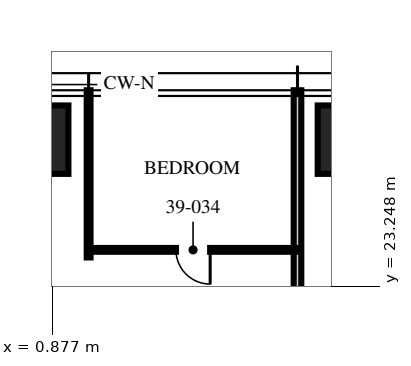
"""IFC4 building model, lengths in metres.
Left out: names, types, materials, properties, quantities, classifications, styles, units other than length and angle.
Written with IfcOpenShell. Run it as: python <this file> out.ifc"""

import sys

from ifc_helpers import new_model, si_unit, direction, frame, frame_2d, origin, origin_2d, place, context, subcontext, project, spatial, rectangle, extrude, element, fill, save


model = new_model("IFC4")
c1 = context("Model", 3, precision=1e-05, world=origin(), true_north=direction((0.0, 1.0)))
c2 = subcontext(c1, "Body", "Model", "MODEL_VIEW")
j1 = project(units=[si_unit("LENGTHUNIT", "METRE"), si_unit("PLANEANGLEUNIT", "RADIAN")], contexts=[c1])
p1 = place(None, origin())
s1 = spatial("IfcSite", under=j1, at=p1, CompositionType="ELEMENT")
p2 = place(p1, origin())
s2 = spatial("IfcBuilding", under=s1, at=p2, CompositionType="ELEMENT")
p3 = place(p2, frame((0.0, 0.0, 156.0)))
s3 = spatial("IfcBuildingStorey", under=s2, at=p3, CompositionType="ELEMENT", Elevation=156.0)
for number, where, z_axis, x_axis in (
    (1, (0.0, 27.1, 0.0), (0.0, 0.0, 1.0), (1.0, 0.0, 0.0)),
    (2, (9.16, 27.1, 0.0), (0.0, 0.0, 1.0), (1.0, 0.0, 0.0)),
):
    element("IfcColumn", number, at=place(p3, frame(where, z_axis=z_axis, x_axis=x_axis)), inside=s3, PredefinedType="COLUMN", context=c2, shape_type="SweptSolid", body=[
        extrude(rectangle(XDim=2.6, YDim=1.8, at=origin_2d()), origin(), (0.0, 0.0, 1.0), 3.75),
    ])
p4 = place(p3, frame((7.328, 16.5, 0.0), z_axis=(0.0, 0.0, 1.0), x_axis=(0.0, 1.0, 0.0)))
e3 = element("IfcWall", 3, at=p4, inside=s3, PredefinedType="PARTITIONING", context=c2, shape_type="SweptSolid", body=[
    extrude(rectangle(XDim=11.9, YDim=0.2, at=frame_2d((5.95, 0.0))), origin(), (0.0, 0.0, 1.0), 2.81),
])
p5 = place(p3, frame((1.832, 24.0, 0.0), z_axis=(0.0, 0.0, 1.0), x_axis=(0.0, 1.0, 0.0)))
e4 = element("IfcWall", 4, at=p5, inside=s3, PredefinedType="PARTITIONING", context=c2, shape_type="SweptSolid", body=[
    extrude(rectangle(XDim=4.4, YDim=0.1, at=frame_2d((2.2, 0.0))), origin(), (0.0, 0.0, 1.0), 2.81),
])
p6 = place(p3, frame((7.328, 24.2, 0.0), z_axis=(0.0, 0.0, 1.0), x_axis=(-1.0, 0.0, 0.0)))
e5 = element("IfcWall", 5, at=p6, inside=s3, PredefinedType="PARTITIONING", context=c2, shape_type="SweptSolid", body=[
    extrude(rectangle(XDim=5.496, YDim=0.1, at=frame_2d((2.748, 0.0))), origin(), (0.0, 0.0, 1.0), 2.81),
])
p7 = place(p6, frame((2.298, 0.0, 0.0)))
e6 = element("IfcOpeningElement", 6, at=p7, cuts=e5, PredefinedType="OPENING", context=c2, shape_type="SweptSolid", body=[
    extrude(rectangle(XDim=0.9, YDim=2.1, at=frame_2d((0.45, 1.05))), frame((0.0, 0.06, 0.0), z_axis=(0.0, -1.0, 0.0), x_axis=(1.0, 0.0, 0.0)), (0.0, 0.0, 1.0), 0.12),
])
p8 = place(p7, origin())
e7 = element("IfcDoor", 7, at=p8, inside=s3, OperationType="SINGLE_SWING_LEFT", PredefinedType="DOOR", context=c2, shape_type="SweptSolid", body=[
    extrude(rectangle(XDim=0.9, YDim=2.1, at=frame_2d((0.45, 1.05))), frame((0.0, 0.025, 0.0), z_axis=(0.0, -1.0, 0.0), x_axis=(1.0, 0.0, 0.0)), (0.0, 0.0, 1.0), 0.05),
])
fill(e6, e7)
save(model, sys.argv[1])
